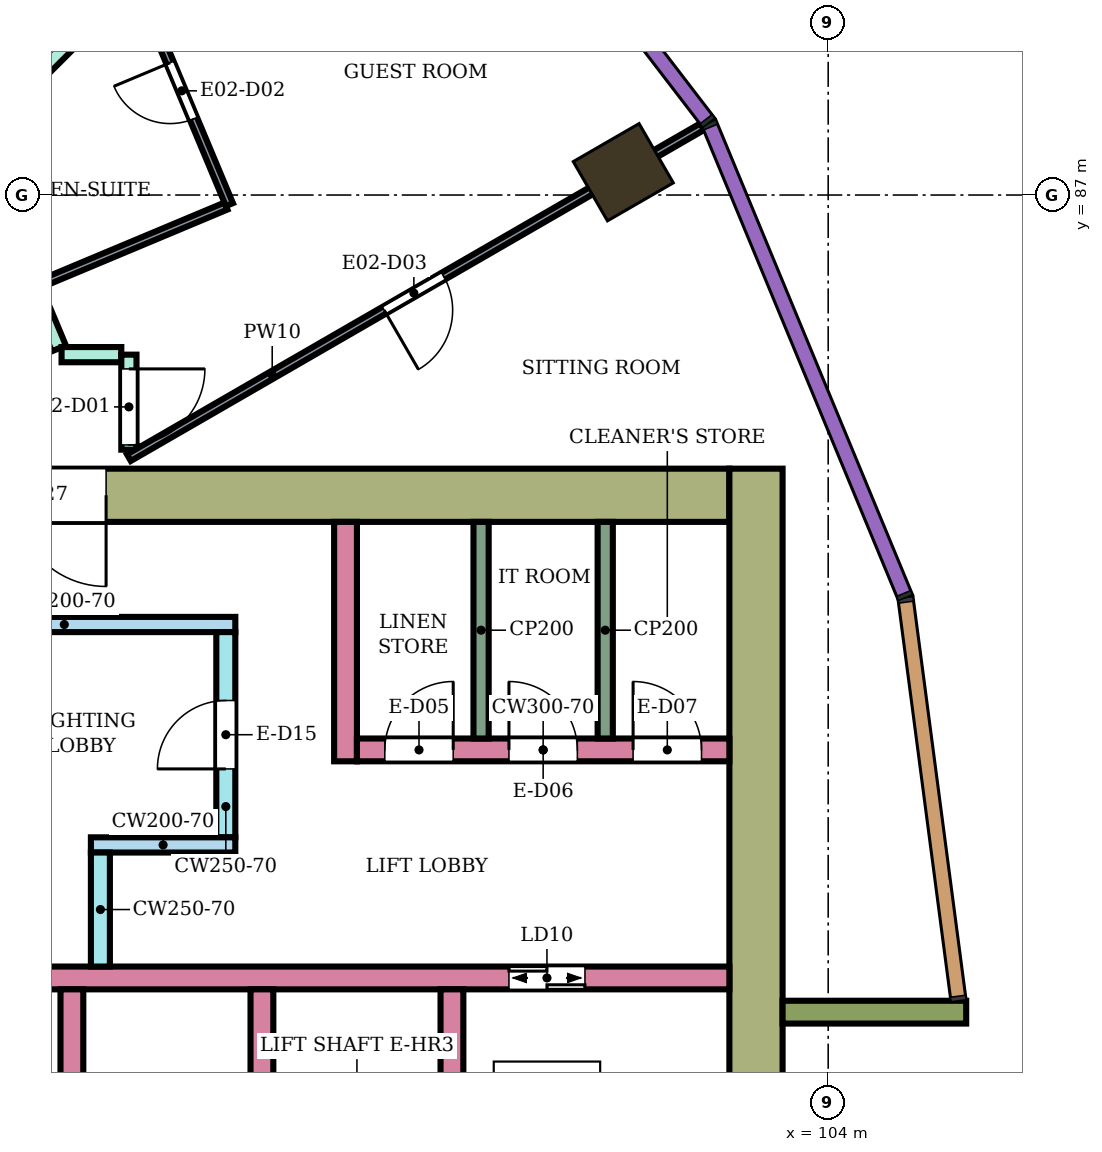
"""IFC4 building model, lengths in metres.
Left out: names, types, materials, properties, quantities, classifications, styles, units other than length and angle.
Written with IfcOpenShell. Run it as: python <this file> out.ifc"""

import sys

from ifc_helpers import new_model, si_unit, direction, frame, frame_2d, origin, origin_2d, place, context, subcontext, project, spatial, rectangle, extrude, element, fill, save


model = new_model("IFC4")
c1 = context("Model", 3, precision=1e-05, world=origin(), true_north=direction((0.0, 1.0)))
c2 = subcontext(c1, "Body", "Model", "MODEL_VIEW")
j1 = project(units=[si_unit("LENGTHUNIT", "METRE"), si_unit("PLANEANGLEUNIT", "RADIAN")], contexts=[c1])
p1 = place(None, origin())
s1 = spatial("IfcSite", under=j1, at=p1, CompositionType="ELEMENT")
p2 = place(p1, origin())
s2 = spatial("IfcBuilding", under=s1, at=p2, CompositionType="ELEMENT")
p3 = place(p2, frame((0.0, 0.0, 134.1)))
s3 = spatial("IfcBuildingStorey", under=s2, at=p3, CompositionType="ELEMENT", Elevation=134.1)
p4 = place(p3, frame((101.304, 87.3, 0.0), z_axis=(0.0, 0.0, 1.0), x_axis=(0.866025403784, 0.5, 0.0)))
e1 = element("IfcColumn", 1, at=p4, inside=s3, PredefinedType="COLUMN", context=c2, shape_type="SweptSolid", body=[
    extrude(rectangle(XDim=1.0, YDim=0.9, at=origin_2d()), origin(), (0.0, 0.0, 1.0), 3.9),
])
p5 = place(p3, frame((87.9, 83.05, 0.0), z_axis=(0.0, 0.0, 1.0), x_axis=(1.0, 0.0, 0.0)))
e2 = element("IfcWall", 2, at=p5, inside=s3, PredefinedType="SHEAR", context=c2, shape_type="SweptSolid", body=[
    extrude(rectangle(XDim=14.8, YDim=0.7, at=frame_2d((7.4, 0.0))), origin(), (0.0, 0.0, 1.0), 3.58),
])
p6 = place(p5, frame((4.2, 0.0, 0.0)))
e3 = element("IfcOpeningElement", 3, at=p6, cuts=e2, PredefinedType="OPENING", context=c2, shape_type="SweptSolid", body=[
    extrude(rectangle(XDim=2.4, YDim=2.4, at=frame_2d((1.2, 1.2))), frame((0.0, 0.36, 0.0), z_axis=(0.0, -1.0, 0.0), x_axis=(1.0, 0.0, 0.0)), (0.0, 0.0, 1.0), 0.72),
])
p7 = place(p3, frame((103.05, 66.6, 0.0), z_axis=(0.0, 0.0, 1.0), x_axis=(0.0, 1.0, 0.0)))
e4 = element("IfcWall", 4, at=p7, inside=s3, PredefinedType="SHEAR", context=c2, shape_type="SweptSolid", body=[
    extrude(rectangle(XDim=16.8, YDim=0.7, at=frame_2d((8.4, 0.0))), origin(), (0.0, 0.0, 1.0), 3.58),
])
p8 = place(p3, frame((91.7, 76.7, 0.0), z_axis=(0.0, 0.0, 1.0), x_axis=(1.0, 0.0, 0.0)))
e5 = element("IfcWall", 5, at=p8, inside=s3, PredefinedType="SHEAR", context=c2, shape_type="SweptSolid", body=[
    extrude(rectangle(XDim=11.0, YDim=0.3, at=frame_2d((5.5, 0.0))), origin(), (0.0, 0.0, 1.0), 3.58),
])
p9 = place(p8, frame((0.55, 0.0, 0.0)))
e6 = element("IfcOpeningElement", 6, at=p9, cuts=e5, PredefinedType="OPENING", context=c2, shape_type="SweptSolid", body=[
    extrude(rectangle(XDim=1.1, YDim=2.1, at=frame_2d((0.55, 1.05))), frame((0.0, 0.16, 0.0), z_axis=(0.0, -1.0, 0.0), x_axis=(1.0, 0.0, 0.0)), (0.0, 0.0, 1.0), 0.32),
])
p10 = place(p8, frame((8.1, 0.0, 0.0)))
e7 = element("IfcOpeningElement", 7, at=p10, cuts=e5, PredefinedType="OPENING", context=c2, shape_type="SweptSolid", body=[
    extrude(rectangle(XDim=1.0, YDim=2.1, at=frame_2d((0.5, 1.05))), frame((0.0, 0.16, 0.0), z_axis=(0.0, -1.0, 0.0), x_axis=(1.0, 0.0, 0.0)), (0.0, 0.0, 1.0), 0.32),
])
for number, where, z_axis, x_axis in (
    (8, (94.05, 74.0, 0.0), (0.0, 0.0, 1.0), (0.0, 1.0, 0.0)),
    (9, (96.55, 74.0, 0.0), (0.0, 0.0, 1.0), (0.0, 1.0, 0.0)),
    (10, (99.05, 74.0, 0.0), (0.0, 0.0, 1.0), (0.0, 1.0, 0.0)),
):
    element("IfcWall", number, at=place(p3, frame(where, z_axis=z_axis, x_axis=x_axis)), inside=s3, PredefinedType="SHEAR", context=c2, shape_type="SweptSolid", body=[
        extrude(rectangle(XDim=2.55, YDim=0.3, at=frame_2d((1.275, 0.0))), origin(), (0.0, 0.0, 1.0), 3.58),
    ])
p11 = place(p3, frame((91.7, 81.35, 0.0), z_axis=(0.0, 0.0, 1.0), x_axis=(1.0, 0.0, 0.0)))
e11 = element("IfcWall", 11, at=p11, inside=s3, PredefinedType="SHEAR", context=c2, shape_type="SweptSolid", body=[
    extrude(rectangle(XDim=4.5, YDim=0.2, at=frame_2d((2.25, 0.0))), origin(), (0.0, 0.0, 1.0), 3.58),
])
p12 = place(p3, frame((96.075, 78.55, 0.0), z_axis=(0.0, 0.0, 1.0), x_axis=(0.0, 1.0, 0.0)))
e12 = element("IfcWall", 12, at=p12, inside=s3, PredefinedType="SHEAR", context=c2, shape_type="SweptSolid", body=[
    extrude(rectangle(XDim=2.7, YDim=0.25, at=frame_2d((1.35, 0.0))), origin(), (0.0, 0.0, 1.0), 3.58),
])
p13 = place(p12, frame((0.9, 0.0, 0.0)))
e13 = element("IfcOpeningElement", 13, at=p13, cuts=e12, PredefinedType="OPENING", context=c2, shape_type="SweptSolid", body=[
    extrude(rectangle(XDim=0.9, YDim=2.1, at=frame_2d((0.45, 1.05))), frame((0.0, 0.135, 0.0), z_axis=(0.0, -1.0, 0.0), x_axis=(1.0, 0.0, 0.0)), (0.0, 0.0, 1.0), 0.27),
])
p14 = place(p3, frame((94.3, 78.45, 0.0), z_axis=(0.0, 0.0, 1.0), x_axis=(1.0, 0.0, 0.0)))
e14 = element("IfcWall", 14, at=p14, inside=s3, PredefinedType="SHEAR", context=c2, shape_type="SweptSolid", body=[
    extrude(rectangle(XDim=1.9, YDim=0.2, at=frame_2d((0.95, 0.0))), origin(), (0.0, 0.0, 1.0), 3.58),
])
p15 = place(p3, frame((94.425, 76.85, 0.0), z_axis=(0.0, 0.0, 1.0), x_axis=(0.0, 1.0, 0.0)))
e15 = element("IfcWall", 15, at=p15, inside=s3, PredefinedType="SHEAR", context=c2, shape_type="SweptSolid", body=[
    extrude(rectangle(XDim=1.5, YDim=0.25, at=frame_2d((0.75, 0.0))), origin(), (0.0, 0.0, 1.0), 3.58),
])
p16 = place(p3, frame((97.65, 79.55, 0.0), z_axis=(0.0, 0.0, 1.0), x_axis=(0.0, 1.0, 0.0)))
e16 = element("IfcWall", 16, at=p16, inside=s3, PredefinedType="SHEAR", context=c2, shape_type="SweptSolid", body=[
    extrude(rectangle(XDim=3.15, YDim=0.3, at=frame_2d((1.575, 0.0))), origin(), (0.0, 0.0, 1.0), 3.58),
])
p17 = place(p3, frame((97.8, 79.7, 0.0), z_axis=(0.0, 0.0, 1.0), x_axis=(1.0, 0.0, 0.0)))
e17 = element("IfcWall", 17, at=p17, inside=s3, PredefinedType="SHEAR", context=c2, shape_type="SweptSolid", body=[
    extrude(rectangle(XDim=4.9, YDim=0.3, at=frame_2d((2.45, 0.0))), origin(), (0.0, 0.0, 1.0), 3.58),
])
p18 = place(p17, frame((0.367, 0.0, 0.0)))
e18 = element("IfcOpeningElement", 18, at=p18, cuts=e17, PredefinedType="OPENING", context=c2, shape_type="SweptSolid", body=[
    extrude(rectangle(XDim=0.9, YDim=2.1, at=frame_2d((0.45, 1.05))), frame((0.0, 0.16, 0.0), z_axis=(0.0, -1.0, 0.0), x_axis=(1.0, 0.0, 0.0)), (0.0, 0.0, 1.0), 0.32),
])
p19 = place(p17, frame((2.0, 0.0, 0.0)))
e19 = element("IfcOpeningElement", 19, at=p19, cuts=e17, PredefinedType="OPENING", context=c2, shape_type="SweptSolid", body=[
    extrude(rectangle(XDim=0.9, YDim=2.1, at=frame_2d((0.45, 1.05))), frame((0.0, 0.16, 0.0), z_axis=(0.0, -1.0, 0.0), x_axis=(1.0, 0.0, 0.0)), (0.0, 0.0, 1.0), 0.32),
])
p20 = place(p17, frame((3.633, 0.0, 0.0)))
e20 = element("IfcOpeningElement", 20, at=p20, cuts=e17, PredefinedType="OPENING", context=c2, shape_type="SweptSolid", body=[
    extrude(rectangle(XDim=0.9, YDim=2.1, at=frame_2d((0.45, 1.05))), frame((0.0, 0.16, 0.0), z_axis=(0.0, -1.0, 0.0), x_axis=(1.0, 0.0, 0.0)), (0.0, 0.0, 1.0), 0.32),
])
p21 = place(p3, frame((103.4, 76.25, 0.0), z_axis=(0.0, 0.0, 1.0), x_axis=(1.0, 0.0, 0.0)))
e21 = element("IfcWall", 21, at=p21, inside=s3, PredefinedType="NOTDEFINED", context=c2, shape_type="SweptSolid", body=[
    extrude(rectangle(XDim=2.416, YDim=0.3, at=frame_2d((1.208, 0.0))), origin(), (0.0, 0.0, 1.0), 3.9),
])
p22 = place(p3, frame((90.604, 92.805, 0.0), z_axis=(0.0, 0.0, 1.0), x_axis=(0.386199042801, -0.922415470024, 0.0)))
e22 = element("IfcWall", 22, at=p22, inside=s3, PredefinedType="PARTITIONING", context=c2, shape_type="SweptSolid", body=[
    extrude(rectangle(XDim=8.48, YDim=0.2, at=frame_2d((4.24, 0.0))), origin(), (0.0, 0.0, 1.0), 3.45),
])
p23 = place(p22, frame((3.823, 0.0, 0.0)))
e23 = element("IfcOpeningElement", 23, at=p23, cuts=e22, PredefinedType="OPENING", context=c2, shape_type="SweptSolid", body=[
    extrude(rectangle(XDim=1.0, YDim=2.1, at=frame_2d((0.5, 1.05))), frame((0.0, 0.11, 0.0), z_axis=(0.0, -1.0, 0.0), x_axis=(1.0, 0.0, 0.0)), (0.0, 0.0, 1.0), 0.22),
])
p24 = place(p3, frame((92.832, 87.825, 0.0), z_axis=(0.0, 0.0, 1.0), x_axis=(0.707275688599, 0.706937833418, 0.0)))
e24 = element("IfcWall", 24, at=p24, inside=s3, PredefinedType="PARTITIONING", context=c2, shape_type="SweptSolid", body=[
    extrude(rectangle(XDim=5.058, YDim=0.2, at=frame_2d((2.529, 0.0))), origin(), (0.0, 0.0, 1.0), 3.45),
])
p25 = place(p3, frame((93.914, 84.9, 0.0), z_axis=(0.0, 0.0, 1.0), x_axis=(1.0, 0.0, 0.0)))
e25 = element("IfcWall", 25, at=p25, inside=s3, PredefinedType="PARTITIONING", context=c2, shape_type="SweptSolid", body=[
    extrude(rectangle(XDim=0.786, YDim=0.2, at=frame_2d((0.393, 0.0))), origin(), (0.0, 0.0, 1.0), 3.45),
])
p26 = place(p3, frame((94.8, 83.65, 0.0), z_axis=(0.0, 0.0, 1.0), x_axis=(0.0, 1.0, 0.0)))
e26 = element("IfcWall", 26, at=p26, inside=s3, PredefinedType="PARTITIONING", context=c2, shape_type="SweptSolid", body=[
    extrude(rectangle(XDim=1.25, YDim=0.2, at=frame_2d((0.625, 0.0))), origin(), (0.0, 0.0, 1.0), 3.45),
])
p27 = place(p26, frame((0.062, 0.0, 0.0)))
e27 = element("IfcOpeningElement", 27, at=p27, cuts=e26, PredefinedType="OPENING", context=c2, shape_type="SweptSolid", body=[
    extrude(rectangle(XDim=1.0, YDim=2.1, at=frame_2d((0.5, 1.05))), frame((0.0, 0.11, 0.0), z_axis=(0.0, -1.0, 0.0), x_axis=(1.0, 0.0, 0.0)), (0.0, 0.0, 1.0), 0.22),
])
p28 = place(p3, frame((93.633, 85.831, 0.0), z_axis=(0.0, 0.0, 1.0), x_axis=(0.922344808264, 0.38636777126, 0.0)))
e28 = element("IfcWall", 28, at=p28, inside=s3, PredefinedType="PARTITIONING", context=c2, shape_type="SweptSolid", body=[
    extrude(rectangle(XDim=2.65, YDim=0.1, at=frame_2d((1.325, 0.0))), origin(), (0.0, 0.0, 1.0), 3.45),
])
p29 = place(p3, frame((94.8, 83.545, 0.0), z_axis=(0.0, 0.0, 1.0), x_axis=(0.86602264145, 0.500004784474, 0.0)))
e29 = element("IfcWall", 29, at=p29, inside=s3, PredefinedType="PARTITIONING", context=c2, shape_type="SweptSolid", body=[
    extrude(rectangle(XDim=8.708, YDim=0.1, at=frame_2d((4.354, 0.0))), origin(), (0.0, 0.0, 1.0), 3.45),
])
p30 = place(p29, frame((3.879, 0.0, 0.0)))
e30 = element("IfcOpeningElement", 30, at=p30, cuts=e29, PredefinedType="OPENING", context=c2, shape_type="SweptSolid", body=[
    extrude(rectangle(XDim=0.9, YDim=2.1, at=frame_2d((0.45, 1.05))), frame((0.0, 0.06, 0.0), z_axis=(0.0, -1.0, 0.0), x_axis=(1.0, 0.0, 0.0)), (0.0, 0.0, 1.0), 0.12),
])
p31 = place(p3, frame((94.919, 89.748, 0.0), z_axis=(0.0, 0.0, 1.0), x_axis=(0.386255913529, -0.922391657196, 0.0)))
e31 = element("IfcWall", 31, at=p31, inside=s3, PredefinedType="PARTITIONING", context=c2, shape_type="SweptSolid", body=[
    extrude(rectangle(XDim=3.116, YDim=0.1, at=frame_2d((1.558, 0.0))), origin(), (0.0, 0.0, 1.0), 3.45),
])
p32 = place(p31, frame((1.093, 0.0, 0.0)))
e32 = element("IfcOpeningElement", 32, at=p32, cuts=e31, PredefinedType="OPENING", context=c2, shape_type="SweptSolid", body=[
    extrude(rectangle(XDim=0.8, YDim=2.1, at=frame_2d((0.4, 1.05))), frame((0.0, 0.06, 0.0), z_axis=(0.0, -1.0, 0.0), x_axis=(1.0, 0.0, 0.0)), (0.0, 0.0, 1.0), 0.12),
])
for number, where, z_axis, x_axis in (
    (33, (99.433, 79.85, 0.0), (0.0, 0.0, 1.0), (0.0, 1.0, 0.0)),
    (34, (101.067, 79.85, 0.0), (0.0, 0.0, 1.0), (0.0, 1.0, 0.0)),
):
    element("IfcWall", number, at=place(p3, frame(where, z_axis=z_axis, x_axis=x_axis)), inside=s3, PredefinedType="PARTITIONING", context=c2, shape_type="SweptSolid", body=[
        extrude(rectangle(XDim=2.85, YDim=0.2, at=frame_2d((1.425, 0.0))), origin(), (0.0, 0.0, 1.0), 3.58),
    ])
p33 = place(p27, frame((1.0, 0.0, 0.0), z_axis=(0.0, 0.0, 1.0), x_axis=(-1.0, 0.0, 0.0)))
e35 = element("IfcDoor", 35, at=p33, inside=s3, OperationType="SINGLE_SWING_LEFT", PredefinedType="DOOR", context=c2, shape_type="SweptSolid", body=[
    extrude(rectangle(XDim=1.0, YDim=2.1, at=frame_2d((0.5, 1.05))), frame((0.0, 0.025, 0.0), z_axis=(0.0, -1.0, 0.0), x_axis=(1.0, 0.0, 0.0)), (0.0, 0.0, 1.0), 0.05),
])
fill(e27, e35)
p34 = place(p32, frame((0.8, 0.0, 0.0), z_axis=(0.0, 0.0, 1.0), x_axis=(-1.0, 0.0, 0.0)))
e36 = element("IfcDoor", 36, at=p34, inside=s3, OperationType="SINGLE_SWING_RIGHT", PredefinedType="DOOR", context=c2, shape_type="SweptSolid", body=[
    extrude(rectangle(XDim=0.8, YDim=2.1, at=frame_2d((0.4, 1.05))), frame((0.0, 0.025, 0.0), z_axis=(0.0, -1.0, 0.0), x_axis=(1.0, 0.0, 0.0)), (0.0, 0.0, 1.0), 0.05),
])
fill(e32, e36)
p35 = place(p30, frame((0.9, 0.0, 0.0), z_axis=(0.0, 0.0, 1.0), x_axis=(-1.0, 0.0, 0.0)))
e37 = element("IfcDoor", 37, at=p35, inside=s3, OperationType="SINGLE_SWING_RIGHT", PredefinedType="DOOR", context=c2, shape_type="SweptSolid", body=[
    extrude(rectangle(XDim=0.9, YDim=2.1, at=frame_2d((0.45, 1.05))), frame((0.0, 0.025, 0.0), z_axis=(0.0, -1.0, 0.0), x_axis=(1.0, 0.0, 0.0)), (0.0, 0.0, 1.0), 0.05),
])
fill(e30, e37)
p36 = place(p10, origin())
e38 = element("IfcDoor", 38, at=p36, inside=s3, OperationType="DOUBLE_DOOR_SLIDING", PredefinedType="DOOR", context=c2, shape_type="SweptSolid", body=[
    extrude(rectangle(XDim=1.0, YDim=2.1, at=frame_2d((0.5, 1.05))), frame((0.0, 0.025, 0.0), z_axis=(0.0, -1.0, 0.0), x_axis=(1.0, 0.0, 0.0)), (0.0, 0.0, 1.0), 0.05),
])
fill(e7, e38)
p37 = place(p13, origin())
e39 = element("IfcDoor", 39, at=p37, inside=s3, OperationType="SINGLE_SWING_LEFT", PredefinedType="DOOR", context=c2, shape_type="SweptSolid", body=[
    extrude(rectangle(XDim=0.9, YDim=2.1, at=frame_2d((0.45, 1.05))), frame((0.0, 0.025, 0.0), z_axis=(0.0, -1.0, 0.0), x_axis=(1.0, 0.0, 0.0)), (0.0, 0.0, 1.0), 0.05),
])
fill(e13, e39)
p38 = place(p18, origin())
e40 = element("IfcDoor", 40, at=p38, inside=s3, OperationType="SINGLE_SWING_RIGHT", PredefinedType="DOOR", context=c2, shape_type="SweptSolid", body=[
    extrude(rectangle(XDim=0.9, YDim=2.1, at=frame_2d((0.45, 1.05))), frame((0.0, 0.025, 0.0), z_axis=(0.0, -1.0, 0.0), x_axis=(1.0, 0.0, 0.0)), (0.0, 0.0, 1.0), 0.05),
])
fill(e18, e40)
p39 = place(p19, origin())
e41 = element("IfcDoor", 41, at=p39, inside=s3, OperationType="SINGLE_SWING_LEFT", PredefinedType="DOOR", context=c2, shape_type="SweptSolid", body=[
    extrude(rectangle(XDim=0.9, YDim=2.1, at=frame_2d((0.45, 1.05))), frame((0.0, 0.025, 0.0), z_axis=(0.0, -1.0, 0.0), x_axis=(1.0, 0.0, 0.0)), (0.0, 0.0, 1.0), 0.05),
])
fill(e19, e41)
p40 = place(p20, origin())
e42 = element("IfcDoor", 42, at=p40, inside=s3, OperationType="SINGLE_SWING_LEFT", PredefinedType="DOOR", context=c2, shape_type="SweptSolid", body=[
    extrude(rectangle(XDim=0.9, YDim=2.1, at=frame_2d((0.45, 1.05))), frame((0.0, 0.025, 0.0), z_axis=(0.0, -1.0, 0.0), x_axis=(1.0, 0.0, 0.0)), (0.0, 0.0, 1.0), 0.05),
])
fill(e20, e42)
p41 = place(p6, frame((2.4, 0.0, 0.0), z_axis=(0.0, 0.0, 1.0), x_axis=(-1.0, 0.0, 0.0)))
e43 = element("IfcDoor", 43, at=p41, inside=s3, OperationType="DOUBLE_DOOR_SINGLE_SWING", PredefinedType="DOOR", context=c2, shape_type="SweptSolid", body=[
    extrude(rectangle(XDim=2.4, YDim=2.4, at=frame_2d((1.2, 1.2))), frame((0.0, 0.025, 0.0), z_axis=(0.0, -1.0, 0.0), x_axis=(1.0, 0.0, 0.0)), (0.0, 0.0, 1.0), 0.05),
])
fill(e3, e43)
save(model, sys.argv[1])
